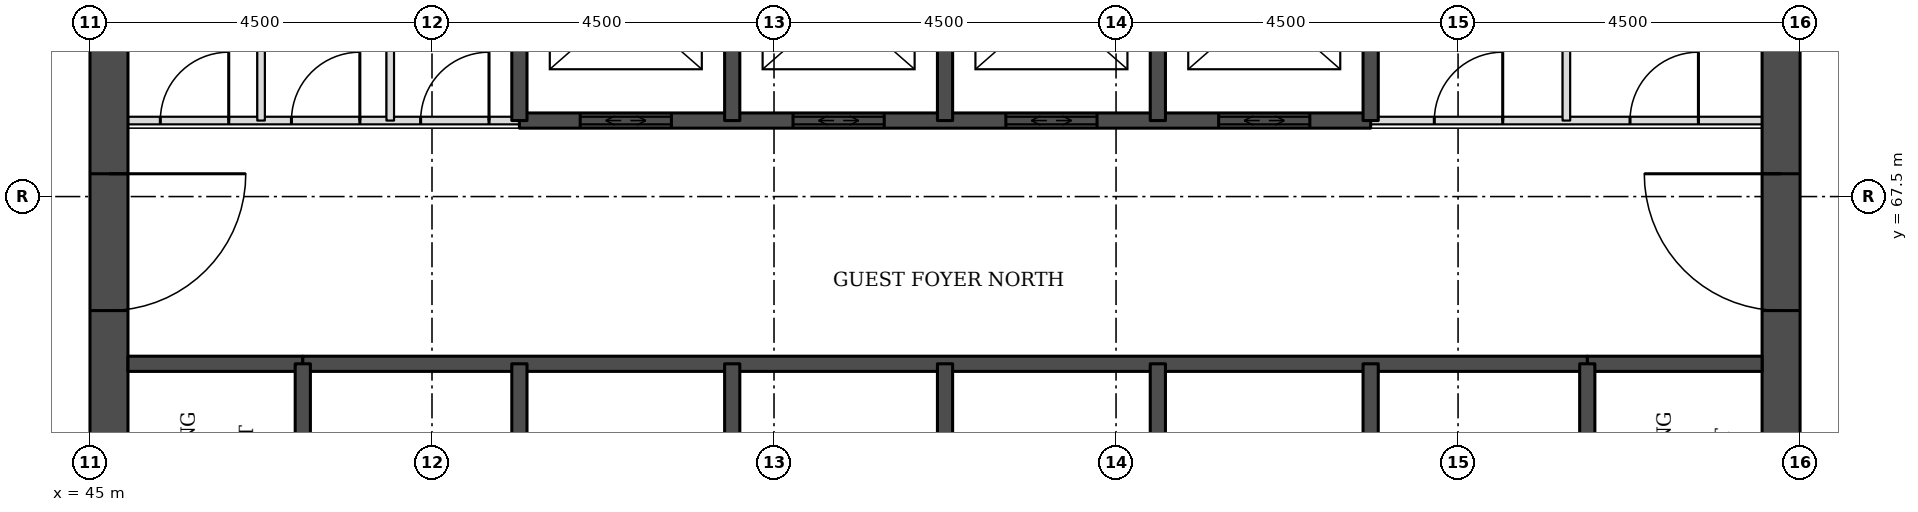
"""IFC4 building model, lengths in metres.
Left out: names, types, materials, properties, quantities, classifications, styles, units other than length and angle.
Written with IfcOpenShell. Run it as: python <this file> out.ifc"""

import sys

from ifc_helpers import new_model, si_unit, direction, frame, frame_2d, origin, place, context, subcontext, project, spatial, rectangle, extrude, element, fill, save


model = new_model("IFC4")
c1 = context("Model", 3, precision=1e-05, world=origin(), true_north=direction((0.0, 1.0)))
c2 = subcontext(c1, "Body", "Model", "MODEL_VIEW")
j1 = project(units=[si_unit("LENGTHUNIT", "METRE"), si_unit("PLANEANGLEUNIT", "RADIAN")], contexts=[c1])
p1 = place(None, origin())
s1 = spatial("IfcSite", under=j1, at=p1, CompositionType="ELEMENT")
p2 = place(p1, origin())
s2 = spatial("IfcBuilding", under=s1, at=p2, CompositionType="ELEMENT")
p3 = place(p2, frame((0.0, 0.0, 42.9)))
s3 = spatial("IfcBuildingStorey", under=s2, at=p3, CompositionType="ELEMENT", Elevation=42.9)
p4 = place(p3, frame((45.25, 49.5, 0.0), z_axis=(0.0, 0.0, 1.0), x_axis=(0.0, 1.0, 0.0)))
e1 = element("IfcWall", 1, at=p4, inside=s3, PredefinedType="SHEAR", context=c2, shape_type="SweptSolid", body=[
    extrude(rectangle(XDim=22.5, YDim=0.5, at=frame_2d((11.25, 0.0))), origin(), (0.0, 0.0, 1.0), 3.3),
])
p5 = place(p4, frame((4.2, 0.0, 0.0)))
e2 = element("IfcOpeningElement", 2, at=p5, cuts=e1, PredefinedType="OPENING", context=c2, shape_type="SweptSolid", body=[
    extrude(rectangle(XDim=1.8, YDim=2.1, at=frame_2d((0.9, 1.05))), frame((0.0, 0.26, 0.0), z_axis=(0.0, -1.0, 0.0), x_axis=(1.0, 0.0, 0.0)), (0.0, 0.0, 1.0), 0.52),
])
p6 = place(p4, frame((6.9, 0.0, 0.0)))
e3 = element("IfcOpeningElement", 3, at=p6, cuts=e1, PredefinedType="OPENING", context=c2, shape_type="SweptSolid", body=[
    extrude(rectangle(XDim=1.1, YDim=2.1, at=frame_2d((0.55, 1.05))), frame((0.0, 0.26, 0.0), z_axis=(0.0, -1.0, 0.0), x_axis=(1.0, 0.0, 0.0)), (0.0, 0.0, 1.0), 0.52),
])
p7 = place(p4, frame((13.6, 0.0, 0.0)))
e4 = element("IfcOpeningElement", 4, at=p7, cuts=e1, PredefinedType="OPENING", context=c2, shape_type="SweptSolid", body=[
    extrude(rectangle(XDim=1.1, YDim=2.1, at=frame_2d((0.55, 1.05))), frame((0.0, 0.26, 0.0), z_axis=(0.0, -1.0, 0.0), x_axis=(1.0, 0.0, 0.0)), (0.0, 0.0, 1.0), 0.52),
])
p8 = place(p4, frame((16.5, 0.0, 0.0)))
e5 = element("IfcOpeningElement", 5, at=p8, cuts=e1, PredefinedType="OPENING", context=c2, shape_type="SweptSolid", body=[
    extrude(rectangle(XDim=1.8, YDim=2.1, at=frame_2d((0.9, 1.05))), frame((0.0, 0.26, 0.0), z_axis=(0.0, -1.0, 0.0), x_axis=(1.0, 0.0, 0.0)), (0.0, 0.0, 1.0), 0.52),
])
p9 = place(p3, frame((67.25, 49.5, 0.0), z_axis=(0.0, 0.0, 1.0), x_axis=(0.0, 1.0, 0.0)))
e6 = element("IfcWall", 6, at=p9, inside=s3, PredefinedType="SHEAR", context=c2, shape_type="SweptSolid", body=[
    extrude(rectangle(XDim=22.5, YDim=0.5, at=frame_2d((11.25, 0.0))), origin(), (0.0, 0.0, 1.0), 3.3),
])
p10 = place(p9, frame((4.2, 0.0, 0.0)))
e7 = element("IfcOpeningElement", 7, at=p10, cuts=e6, PredefinedType="OPENING", context=c2, shape_type="SweptSolid", body=[
    extrude(rectangle(XDim=1.8, YDim=2.1, at=frame_2d((0.9, 1.05))), frame((0.0, 0.26, 0.0), z_axis=(0.0, -1.0, 0.0), x_axis=(1.0, 0.0, 0.0)), (0.0, 0.0, 1.0), 0.52),
])
p11 = place(p9, frame((6.9, 0.0, 0.0)))
e8 = element("IfcOpeningElement", 8, at=p11, cuts=e6, PredefinedType="OPENING", context=c2, shape_type="SweptSolid", body=[
    extrude(rectangle(XDim=1.1, YDim=2.1, at=frame_2d((0.55, 1.05))), frame((0.0, 0.26, 0.0), z_axis=(0.0, -1.0, 0.0), x_axis=(1.0, 0.0, 0.0)), (0.0, 0.0, 1.0), 0.52),
])
p12 = place(p9, frame((13.6, 0.0, 0.0)))
e9 = element("IfcOpeningElement", 9, at=p12, cuts=e6, PredefinedType="OPENING", context=c2, shape_type="SweptSolid", body=[
    extrude(rectangle(XDim=1.1, YDim=2.1, at=frame_2d((0.55, 1.05))), frame((0.0, 0.26, 0.0), z_axis=(0.0, -1.0, 0.0), x_axis=(1.0, 0.0, 0.0)), (0.0, 0.0, 1.0), 0.52),
])
p13 = place(p9, frame((16.5, 0.0, 0.0)))
e10 = element("IfcOpeningElement", 10, at=p13, cuts=e6, PredefinedType="OPENING", context=c2, shape_type="SweptSolid", body=[
    extrude(rectangle(XDim=1.8, YDim=2.1, at=frame_2d((0.9, 1.05))), frame((0.0, 0.26, 0.0), z_axis=(0.0, -1.0, 0.0), x_axis=(1.0, 0.0, 0.0)), (0.0, 0.0, 1.0), 0.52),
])
for number, where, z_axis, x_axis in (
    (11, (45.5, 65.3, 0.0), (0.0, 0.0, 1.0), (1.0, 0.0, 0.0)),
    (12, (64.7, 65.3, 0.0), (0.0, 0.0, 1.0), (1.0, 0.0, 0.0)),
):
    element("IfcWall", number, at=place(p3, frame(where, z_axis=z_axis, x_axis=x_axis)), inside=s3, PredefinedType="SOLIDWALL", context=c2, shape_type="SweptSolid", body=[
        extrude(rectangle(XDim=2.3, YDim=0.2, at=frame_2d((1.15, 0.0))), origin(), (0.0, 0.0, 1.0), 3.08),
    ])
p14 = place(p3, frame((47.8, 65.3, 0.0), z_axis=(0.0, 0.0, 1.0), x_axis=(1.0, 0.0, 0.0)))
e13 = element("IfcWall", 13, at=p14, inside=s3, PredefinedType="SOLIDWALL", context=c2, shape_type="SweptSolid", body=[
    extrude(rectangle(XDim=16.9, YDim=0.2, at=frame_2d((8.45, 0.0))), origin(), (0.0, 0.0, 1.0), 3.08),
])
p15 = place(p3, frame((45.5, 68.5, 0.0), z_axis=(0.0, 0.0, 1.0), x_axis=(1.0, 0.0, 0.0)))
e14 = element("IfcWall", 14, at=p15, inside=s3, PredefinedType="PARTITIONING", context=c2, shape_type="SweptSolid", body=[
    extrude(rectangle(XDim=5.15, YDim=0.1, at=frame_2d((2.575, 0.0))), origin(), (0.0, 0.0, 1.0), 3.08),
])
p16 = place(p15, frame((0.426, 0.0, 0.0)))
e15 = element("IfcOpeningElement", 15, at=p16, cuts=e14, PredefinedType="OPENING", context=c2, shape_type="SweptSolid", body=[
    extrude(rectangle(XDim=0.9, YDim=2.1, at=frame_2d((0.45, 1.05))), frame((0.0, 0.06, 0.0), z_axis=(0.0, -1.0, 0.0), x_axis=(1.0, 0.0, 0.0)), (0.0, 0.0, 1.0), 0.12),
])
p17 = place(p15, frame((2.151, 0.0, 0.0)))
e16 = element("IfcOpeningElement", 16, at=p17, cuts=e14, PredefinedType="OPENING", context=c2, shape_type="SweptSolid", body=[
    extrude(rectangle(XDim=0.9, YDim=2.1, at=frame_2d((0.45, 1.05))), frame((0.0, 0.06, 0.0), z_axis=(0.0, -1.0, 0.0), x_axis=(1.0, 0.0, 0.0)), (0.0, 0.0, 1.0), 0.12),
])
p18 = place(p15, frame((3.85, 0.0, 0.0)))
e17 = element("IfcOpeningElement", 17, at=p18, cuts=e14, PredefinedType="OPENING", context=c2, shape_type="SweptSolid", body=[
    extrude(rectangle(XDim=0.9, YDim=2.1, at=frame_2d((0.45, 1.05))), frame((0.0, 0.06, 0.0), z_axis=(0.0, -1.0, 0.0), x_axis=(1.0, 0.0, 0.0)), (0.0, 0.0, 1.0), 0.12),
])
p19 = place(p3, frame((61.85, 68.5, 0.0), z_axis=(0.0, 0.0, 1.0), x_axis=(1.0, 0.0, 0.0)))
e18 = element("IfcWall", 18, at=p19, inside=s3, PredefinedType="PARTITIONING", context=c2, shape_type="SweptSolid", body=[
    extrude(rectangle(XDim=5.15, YDim=0.1, at=frame_2d((2.575, 0.0))), origin(), (0.0, 0.0, 1.0), 3.08),
])
p20 = place(p19, frame((3.413, 0.0, 0.0)))
e19 = element("IfcOpeningElement", 19, at=p20, cuts=e18, PredefinedType="OPENING", context=c2, shape_type="SweptSolid", body=[
    extrude(rectangle(XDim=0.9, YDim=2.1, at=frame_2d((0.45, 1.05))), frame((0.0, 0.06, 0.0), z_axis=(0.0, -1.0, 0.0), x_axis=(1.0, 0.0, 0.0)), (0.0, 0.0, 1.0), 0.12),
])
p21 = place(p19, frame((0.837, 0.0, 0.0)))
e20 = element("IfcOpeningElement", 20, at=p21, cuts=e18, PredefinedType="OPENING", context=c2, shape_type="SweptSolid", body=[
    extrude(rectangle(XDim=0.9, YDim=2.1, at=frame_2d((0.45, 1.05))), frame((0.0, 0.06, 0.0), z_axis=(0.0, -1.0, 0.0), x_axis=(1.0, 0.0, 0.0)), (0.0, 0.0, 1.0), 0.12),
])
p22 = place(p3, frame((50.65, 68.5, 0.0), z_axis=(0.0, 0.0, 1.0), x_axis=(1.0, 0.0, 0.0)))
e21 = element("IfcWall", 21, at=p22, inside=s3, PredefinedType="SOLIDWALL", context=c2, shape_type="SweptSolid", body=[
    extrude(rectangle(XDim=11.2, YDim=0.2, at=frame_2d((5.6, 0.0))), origin(), (0.0, 0.0, 1.0), 3.08),
])
p23 = place(p22, frame((0.8, 0.0, 0.0)))
e22 = element("IfcOpeningElement", 22, at=p23, cuts=e21, PredefinedType="OPENING", context=c2, shape_type="SweptSolid", body=[
    extrude(rectangle(XDim=1.2, YDim=2.1, at=frame_2d((0.6, 1.05))), frame((0.0, 0.11, 0.0), z_axis=(0.0, -1.0, 0.0), x_axis=(1.0, 0.0, 0.0)), (0.0, 0.0, 1.0), 0.22),
])
p24 = place(p22, frame((3.6, 0.0, 0.0)))
e23 = element("IfcOpeningElement", 23, at=p24, cuts=e21, PredefinedType="OPENING", context=c2, shape_type="SweptSolid", body=[
    extrude(rectangle(XDim=1.2, YDim=2.1, at=frame_2d((0.6, 1.05))), frame((0.0, 0.11, 0.0), z_axis=(0.0, -1.0, 0.0), x_axis=(1.0, 0.0, 0.0)), (0.0, 0.0, 1.0), 0.22),
])
p25 = place(p22, frame((6.4, 0.0, 0.0)))
e24 = element("IfcOpeningElement", 24, at=p25, cuts=e21, PredefinedType="OPENING", context=c2, shape_type="SweptSolid", body=[
    extrude(rectangle(XDim=1.2, YDim=2.1, at=frame_2d((0.6, 1.05))), frame((0.0, 0.11, 0.0), z_axis=(0.0, -1.0, 0.0), x_axis=(1.0, 0.0, 0.0)), (0.0, 0.0, 1.0), 0.22),
])
p26 = place(p22, frame((9.2, 0.0, 0.0)))
e25 = element("IfcOpeningElement", 25, at=p26, cuts=e21, PredefinedType="OPENING", context=c2, shape_type="SweptSolid", body=[
    extrude(rectangle(XDim=1.2, YDim=2.1, at=frame_2d((0.6, 1.05))), frame((0.0, 0.11, 0.0), z_axis=(0.0, -1.0, 0.0), x_axis=(1.0, 0.0, 0.0)), (0.0, 0.0, 1.0), 0.22),
])
p27 = place(p3, frame((47.251, 68.5, 0.0), z_axis=(0.0, 0.0, 1.0), x_axis=(0.0, 1.0, 0.0)))
e26 = element("IfcWall", 26, at=p27, inside=s3, PredefinedType="PARTITIONING", context=c2, shape_type="SweptSolid", body=[
    extrude(rectangle(XDim=3.0, YDim=0.1, at=frame_2d((1.5, 0.0))), origin(), (0.0, 0.0, 1.0), 3.08),
])
p28 = place(p3, frame((47.8, 62.0, 0.0), z_axis=(0.0, 0.0, 1.0), x_axis=(0.0, 1.0, 0.0)))
e27 = element("IfcWall", 27, at=p28, inside=s3, PredefinedType="SOLIDWALL", context=c2, shape_type="SweptSolid", body=[
    extrude(rectangle(XDim=3.3, YDim=0.2, at=frame_2d((1.65, 0.0))), origin(), (0.0, 0.0, 1.0), 3.08),
])
p29 = place(p28, frame((1.1, 0.0, 0.0)))
e28 = element("IfcOpeningElement", 28, at=p29, cuts=e27, PredefinedType="OPENING", context=c2, shape_type="SweptSolid", body=[
    extrude(rectangle(XDim=1.1, YDim=2.1, at=frame_2d((0.55, 1.05))), frame((0.0, 0.11, 0.0), z_axis=(0.0, -1.0, 0.0), x_axis=(1.0, 0.0, 0.0)), (0.0, 0.0, 1.0), 0.22),
])
p30 = place(p3, frame((48.95, 68.5, 0.0), z_axis=(0.0, 0.0, 1.0), x_axis=(0.0, 1.0, 0.0)))
e29 = element("IfcWall", 29, at=p30, inside=s3, PredefinedType="PARTITIONING", context=c2, shape_type="SweptSolid", body=[
    extrude(rectangle(XDim=3.0, YDim=0.1, at=frame_2d((1.5, 0.0))), origin(), (0.0, 0.0, 1.0), 3.08),
])
p31 = place(p3, frame((50.65, 62.0, 0.0), z_axis=(0.0, 0.0, 1.0), x_axis=(0.0, 1.0, 0.0)))
e30 = element("IfcWall", 30, at=p31, inside=s3, PredefinedType="SOLIDWALL", context=c2, shape_type="SweptSolid", body=[
    extrude(rectangle(XDim=3.3, YDim=0.2, at=frame_2d((1.65, 0.0))), origin(), (0.0, 0.0, 1.0), 3.08),
])
p32 = place(p3, frame((50.65, 68.5, 0.0), z_axis=(0.0, 0.0, 1.0), x_axis=(0.0, 1.0, 0.0)))
e31 = element("IfcWall", 31, at=p32, inside=s3, PredefinedType="SOLIDWALL", context=c2, shape_type="SweptSolid", body=[
    extrude(rectangle(XDim=3.0, YDim=0.2, at=frame_2d((1.5, 0.0))), origin(), (0.0, 0.0, 1.0), 3.08),
])
p33 = place(p3, frame((53.45, 62.5, 0.0), z_axis=(0.0, 0.0, 1.0), x_axis=(0.0, 1.0, 0.0)))
e32 = element("IfcWall", 32, at=p33, inside=s3, PredefinedType="SOLIDWALL", context=c2, shape_type="SweptSolid", body=[
    extrude(rectangle(XDim=2.8, YDim=0.2, at=frame_2d((1.4, 0.0))), origin(), (0.0, 0.0, 1.0), 3.08),
])
p34 = place(p3, frame((53.45, 68.5, 0.0), z_axis=(0.0, 0.0, 1.0), x_axis=(0.0, 1.0, 0.0)))
e33 = element("IfcWall", 33, at=p34, inside=s3, PredefinedType="SOLIDWALL", context=c2, shape_type="SweptSolid", body=[
    extrude(rectangle(XDim=3.0, YDim=0.2, at=frame_2d((1.5, 0.0))), origin(), (0.0, 0.0, 1.0), 3.08),
])
p35 = place(p3, frame((56.25, 62.5, 0.0), z_axis=(0.0, 0.0, 1.0), x_axis=(0.0, 1.0, 0.0)))
e34 = element("IfcWall", 34, at=p35, inside=s3, PredefinedType="SOLIDWALL", context=c2, shape_type="SweptSolid", body=[
    extrude(rectangle(XDim=2.8, YDim=0.2, at=frame_2d((1.4, 0.0))), origin(), (0.0, 0.0, 1.0), 3.08),
])
p36 = place(p3, frame((56.25, 68.5, 0.0), z_axis=(0.0, 0.0, 1.0), x_axis=(0.0, 1.0, 0.0)))
e35 = element("IfcWall", 35, at=p36, inside=s3, PredefinedType="SOLIDWALL", context=c2, shape_type="SweptSolid", body=[
    extrude(rectangle(XDim=3.0, YDim=0.2, at=frame_2d((1.5, 0.0))), origin(), (0.0, 0.0, 1.0), 3.08),
])
p37 = place(p3, frame((59.05, 62.5, 0.0), z_axis=(0.0, 0.0, 1.0), x_axis=(0.0, 1.0, 0.0)))
e36 = element("IfcWall", 36, at=p37, inside=s3, PredefinedType="SOLIDWALL", context=c2, shape_type="SweptSolid", body=[
    extrude(rectangle(XDim=2.8, YDim=0.2, at=frame_2d((1.4, 0.0))), origin(), (0.0, 0.0, 1.0), 3.08),
])
p38 = place(p3, frame((59.05, 68.5, 0.0), z_axis=(0.0, 0.0, 1.0), x_axis=(0.0, 1.0, 0.0)))
e37 = element("IfcWall", 37, at=p38, inside=s3, PredefinedType="SOLIDWALL", context=c2, shape_type="SweptSolid", body=[
    extrude(rectangle(XDim=3.0, YDim=0.2, at=frame_2d((1.5, 0.0))), origin(), (0.0, 0.0, 1.0), 3.08),
])
p39 = place(p3, frame((61.85, 62.0, 0.0), z_axis=(0.0, 0.0, 1.0), x_axis=(0.0, 1.0, 0.0)))
e38 = element("IfcWall", 38, at=p39, inside=s3, PredefinedType="SOLIDWALL", context=c2, shape_type="SweptSolid", body=[
    extrude(rectangle(XDim=3.3, YDim=0.2, at=frame_2d((1.65, 0.0))), origin(), (0.0, 0.0, 1.0), 3.08),
])
p40 = place(p3, frame((61.85, 68.5, 0.0), z_axis=(0.0, 0.0, 1.0), x_axis=(0.0, 1.0, 0.0)))
e39 = element("IfcWall", 39, at=p40, inside=s3, PredefinedType="SOLIDWALL", context=c2, shape_type="SweptSolid", body=[
    extrude(rectangle(XDim=3.0, YDim=0.2, at=frame_2d((1.5, 0.0))), origin(), (0.0, 0.0, 1.0), 3.08),
])
p41 = place(p3, frame((64.425, 68.5, 0.0), z_axis=(0.0, 0.0, 1.0), x_axis=(0.0, 1.0, 0.0)))
e40 = element("IfcWall", 40, at=p41, inside=s3, PredefinedType="PARTITIONING", context=c2, shape_type="SweptSolid", body=[
    extrude(rectangle(XDim=3.0, YDim=0.1, at=frame_2d((1.5, 0.0))), origin(), (0.0, 0.0, 1.0), 3.08),
])
p42 = place(p3, frame((64.7, 62.0, 0.0), z_axis=(0.0, 0.0, 1.0), x_axis=(0.0, 1.0, 0.0)))
e41 = element("IfcWall", 41, at=p42, inside=s3, PredefinedType="SOLIDWALL", context=c2, shape_type="SweptSolid", body=[
    extrude(rectangle(XDim=3.3, YDim=0.2, at=frame_2d((1.65, 0.0))), origin(), (0.0, 0.0, 1.0), 3.08),
])
p43 = place(p42, frame((1.1, 0.0, 0.0)))
e42 = element("IfcOpeningElement", 42, at=p43, cuts=e41, PredefinedType="OPENING", context=c2, shape_type="SweptSolid", body=[
    extrude(rectangle(XDim=1.1, YDim=2.1, at=frame_2d((0.55, 1.05))), frame((0.0, 0.11, 0.0), z_axis=(0.0, -1.0, 0.0), x_axis=(1.0, 0.0, 0.0)), (0.0, 0.0, 1.0), 0.22),
])
p44 = place(p23, origin())
e43 = element("IfcDoor", 43, at=p44, inside=s3, OperationType="DOUBLE_DOOR_SLIDING", PredefinedType="DOOR", context=c2, shape_type="SweptSolid", body=[
    extrude(rectangle(XDim=1.2, YDim=2.1, at=frame_2d((0.6, 1.05))), frame((0.0, 0.025, 0.0), z_axis=(0.0, -1.0, 0.0), x_axis=(1.0, 0.0, 0.0)), (0.0, 0.0, 1.0), 0.05),
])
fill(e22, e43)
p45 = place(p24, origin())
e44 = element("IfcDoor", 44, at=p45, inside=s3, OperationType="DOUBLE_DOOR_SLIDING", PredefinedType="DOOR", context=c2, shape_type="SweptSolid", body=[
    extrude(rectangle(XDim=1.2, YDim=2.1, at=frame_2d((0.6, 1.05))), frame((0.0, 0.025, 0.0), z_axis=(0.0, -1.0, 0.0), x_axis=(1.0, 0.0, 0.0)), (0.0, 0.0, 1.0), 0.05),
])
fill(e23, e44)
p46 = place(p25, origin())
e45 = element("IfcDoor", 45, at=p46, inside=s3, OperationType="DOUBLE_DOOR_SLIDING", PredefinedType="DOOR", context=c2, shape_type="SweptSolid", body=[
    extrude(rectangle(XDim=1.2, YDim=2.1, at=frame_2d((0.6, 1.05))), frame((0.0, 0.025, 0.0), z_axis=(0.0, -1.0, 0.0), x_axis=(1.0, 0.0, 0.0)), (0.0, 0.0, 1.0), 0.05),
])
fill(e24, e45)
p47 = place(p26, origin())
e46 = element("IfcDoor", 46, at=p47, inside=s3, OperationType="DOUBLE_DOOR_SLIDING", PredefinedType="DOOR", context=c2, shape_type="SweptSolid", body=[
    extrude(rectangle(XDim=1.2, YDim=2.1, at=frame_2d((0.6, 1.05))), frame((0.0, 0.025, 0.0), z_axis=(0.0, -1.0, 0.0), x_axis=(1.0, 0.0, 0.0)), (0.0, 0.0, 1.0), 0.05),
])
fill(e25, e46)
p48 = place(p8, frame((1.8, 0.0, 0.0), z_axis=(0.0, 0.0, 1.0), x_axis=(-1.0, 0.0, 0.0)))
e47 = element("IfcDoor", 47, at=p48, inside=s3, OperationType="SINGLE_SWING_LEFT", PredefinedType="DOOR", context=c2, shape_type="SweptSolid", body=[
    extrude(rectangle(XDim=1.8, YDim=2.1, at=frame_2d((0.9, 1.05))), frame((0.0, 0.025, 0.0), z_axis=(0.0, -1.0, 0.0), x_axis=(1.0, 0.0, 0.0)), (0.0, 0.0, 1.0), 0.05),
])
fill(e5, e47)
p49 = place(p13, origin())
e48 = element("IfcDoor", 48, at=p49, inside=s3, OperationType="SINGLE_SWING_RIGHT", PredefinedType="DOOR", context=c2, shape_type="SweptSolid", body=[
    extrude(rectangle(XDim=1.8, YDim=2.1, at=frame_2d((0.9, 1.05))), frame((0.0, 0.025, 0.0), z_axis=(0.0, -1.0, 0.0), x_axis=(1.0, 0.0, 0.0)), (0.0, 0.0, 1.0), 0.05),
])
fill(e10, e48)
p50 = place(p20, origin())
e49 = element("IfcDoor", 49, at=p50, inside=s3, OperationType="SINGLE_SWING_RIGHT", PredefinedType="DOOR", context=c2, shape_type="SweptSolid", body=[
    extrude(rectangle(XDim=0.9, YDim=2.1, at=frame_2d((0.45, 1.05))), frame((0.0, 0.025, 0.0), z_axis=(0.0, -1.0, 0.0), x_axis=(1.0, 0.0, 0.0)), (0.0, 0.0, 1.0), 0.05),
])
fill(e19, e49)
p51 = place(p21, origin())
e50 = element("IfcDoor", 50, at=p51, inside=s3, OperationType="SINGLE_SWING_RIGHT", PredefinedType="DOOR", context=c2, shape_type="SweptSolid", body=[
    extrude(rectangle(XDim=0.9, YDim=2.1, at=frame_2d((0.45, 1.05))), frame((0.0, 0.025, 0.0), z_axis=(0.0, -1.0, 0.0), x_axis=(1.0, 0.0, 0.0)), (0.0, 0.0, 1.0), 0.05),
])
fill(e20, e50)
p52 = place(p16, origin())
e51 = element("IfcDoor", 51, at=p52, inside=s3, OperationType="SINGLE_SWING_RIGHT", PredefinedType="DOOR", context=c2, shape_type="SweptSolid", body=[
    extrude(rectangle(XDim=0.9, YDim=2.1, at=frame_2d((0.45, 1.05))), frame((0.0, 0.025, 0.0), z_axis=(0.0, -1.0, 0.0), x_axis=(1.0, 0.0, 0.0)), (0.0, 0.0, 1.0), 0.05),
])
fill(e15, e51)
p53 = place(p17, origin())
e52 = element("IfcDoor", 52, at=p53, inside=s3, OperationType="SINGLE_SWING_RIGHT", PredefinedType="DOOR", context=c2, shape_type="SweptSolid", body=[
    extrude(rectangle(XDim=0.9, YDim=2.1, at=frame_2d((0.45, 1.05))), frame((0.0, 0.025, 0.0), z_axis=(0.0, -1.0, 0.0), x_axis=(1.0, 0.0, 0.0)), (0.0, 0.0, 1.0), 0.05),
])
fill(e16, e52)
p54 = place(p18, origin())
e53 = element("IfcDoor", 53, at=p54, inside=s3, OperationType="SINGLE_SWING_RIGHT", PredefinedType="DOOR", context=c2, shape_type="SweptSolid", body=[
    extrude(rectangle(XDim=0.9, YDim=2.1, at=frame_2d((0.45, 1.05))), frame((0.0, 0.025, 0.0), z_axis=(0.0, -1.0, 0.0), x_axis=(1.0, 0.0, 0.0)), (0.0, 0.0, 1.0), 0.05),
])
fill(e17, e53)
save(model, sys.argv[1])
